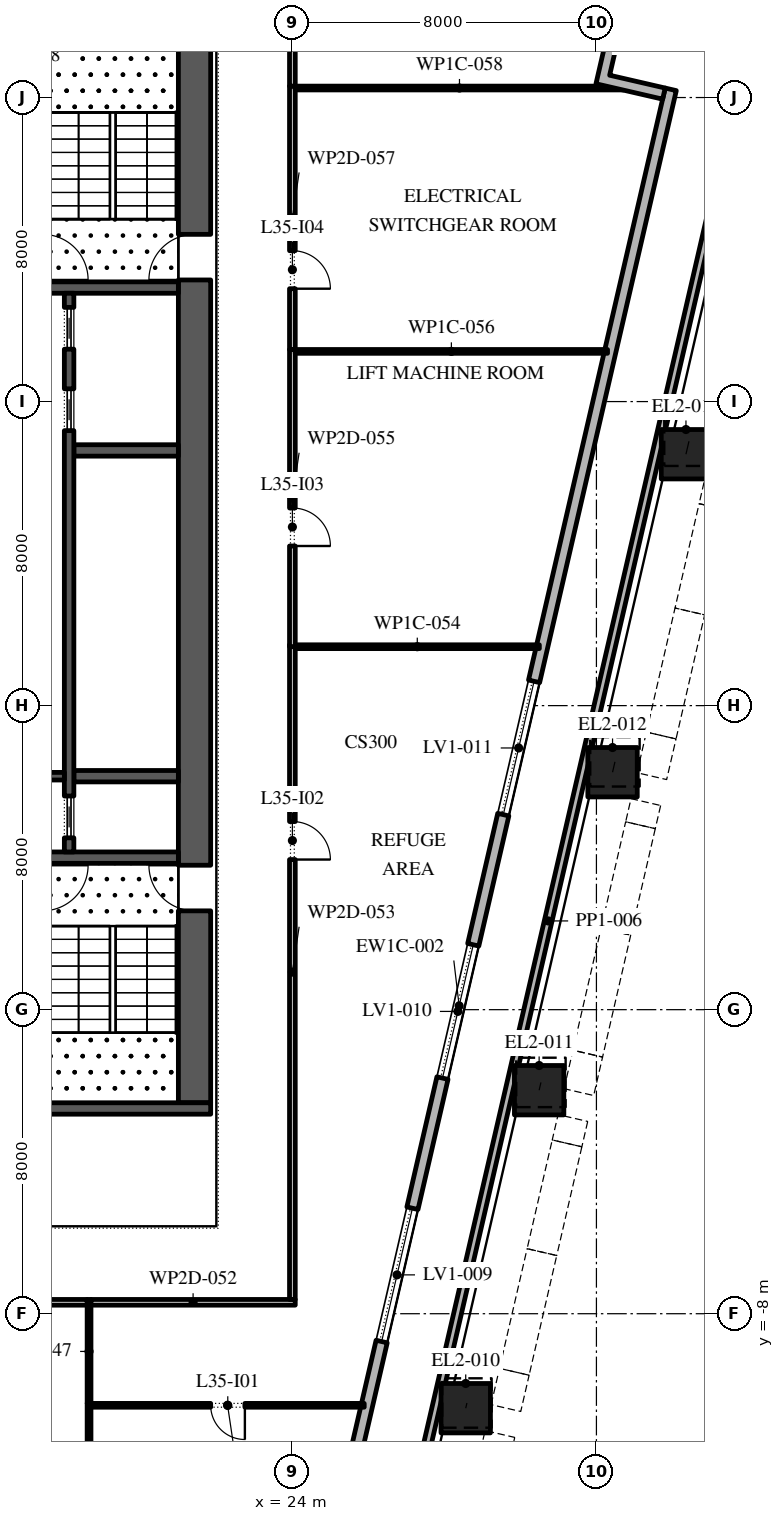
"""IFC4 building model, lengths in metres.
Left out: names, types, materials, properties, quantities, classifications, styles, units other than length and angle.
Written with IfcOpenShell. Run it as: python <this file> out.ifc"""

import sys

from ifc_helpers import new_model, si_unit, direction, frame, frame_2d, origin, origin_2d, place, context, subcontext, project, spatial, polyline, rectangle, outline, extrude, element, fill, save


model = new_model("IFC4")
c1 = context("Model", 3, precision=1e-05, world=origin(), true_north=direction((0.0, 1.0)))
c2 = subcontext(c1, "Body", "Model", "MODEL_VIEW")
j1 = project(units=[si_unit("LENGTHUNIT", "METRE"), si_unit("PLANEANGLEUNIT", "RADIAN")], contexts=[c1])
p1 = place(None, origin())
s1 = spatial("IfcSite", under=j1, at=p1, CompositionType="ELEMENT")
p2 = place(p1, origin())
s2 = spatial("IfcBuilding", under=s1, at=p2, CompositionType="ELEMENT")
p3 = place(p2, frame((0.0, 0.0, 160.2)))
s3 = spatial("IfcBuildingStorey", under=s2, at=p3, CompositionType="ELEMENT", Elevation=160.2)
p4 = place(p3, frame((28.561, -10.486, 0.0), z_axis=(0.005830129404, 0.025263894082, 0.999663816114), x_axis=(-0.974391195695, 0.224859506699, 0.0)))
e1 = element("IfcColumn", 1, at=p4, inside=s3, PredefinedType="COLUMN", context=c2, shape_type="SweptSolid", body=[
    extrude(rectangle(XDim=1.3, YDim=1.3, at=origin_2d()), origin(), (0.0, 0.0, 1.0), 5.402),
])
p5 = place(p3, frame((30.493, -2.119, 0.0), z_axis=(0.00871892839, 0.037902491811, 0.999243404483), x_axis=(-0.974547573978, 0.22418078877, 0.0)))
e2 = element("IfcColumn", 2, at=p5, inside=s3, PredefinedType="COLUMN", context=c2, shape_type="SweptSolid", body=[
    extrude(rectangle(XDim=1.3, YDim=1.3, at=origin_2d()), origin(), (0.0, 0.0, 1.0), 5.404),
])
p6 = place(p3, frame((32.424, 6.248, 0.0), z_axis=(0.011648492007, 0.05052194789, 0.99865501822), x_axis=(-0.97443520668, 0.22466870717, 0.0)))
e3 = element("IfcColumn", 3, at=p6, inside=s3, PredefinedType="COLUMN", context=c2, shape_type="SweptSolid", body=[
    extrude(rectangle(XDim=1.3, YDim=1.3, at=origin_2d()), origin(), (0.0, 0.0, 1.0), 5.407),
])
p7 = place(p3, frame((34.356, 14.615, 0.0), z_axis=(0.014572119901, 0.06316089121, 0.997896966196), x_axis=(-0.974402924741, 0.22480867478, 0.0)))
e4 = element("IfcColumn", 4, at=p7, inside=s3, PredefinedType="COLUMN", context=c2, shape_type="SweptSolid", body=[
    extrude(rectangle(XDim=1.3, YDim=1.3, at=origin_2d()), origin(), (0.0, 0.0, 1.0), 5.412),
])
p8 = place(p3, frame((22.82, -24.016, 0.0), z_axis=(0.0, 0.0, 1.0), x_axis=(0.224953880882, 0.974369412223, 0.0)))
e5 = element("IfcWall", 5, at=p8, inside=s3, PredefinedType="STANDARD", context=c2, shape_type="SweptSolid", body=[
    extrude(rectangle(XDim=49.5, YDim=0.3, at=frame_2d((24.75, 0.0))), origin(), (0.0, 0.0, 1.0), 4.95),
])
p9 = place(p8, frame((15.686, 0.0, 0.6)))
e6 = element("IfcOpeningElement", 6, at=p9, cuts=e5, PredefinedType="OPENING", context=c2, shape_type="SweptSolid", body=[
    extrude(rectangle(XDim=3.6, YDim=3.9, at=frame_2d((1.8, 1.95))), frame((0.0, 0.16, 0.0), z_axis=(0.0, -1.0, 0.0), x_axis=(1.0, 0.0, 0.0)), (0.0, 0.0, 1.0), 0.32),
])
p10 = place(p8, frame((22.8, 0.0, 0.6)))
e7 = element("IfcOpeningElement", 7, at=p10, cuts=e5, PredefinedType="OPENING", context=c2, shape_type="SweptSolid", body=[
    extrude(rectangle(XDim=3.6, YDim=3.9, at=frame_2d((1.8, 1.95))), frame((0.0, 0.16, 0.0), z_axis=(0.0, -1.0, 0.0), x_axis=(1.0, 0.0, 0.0)), (0.0, 0.0, 1.0), 0.32),
])
p11 = place(p8, frame((29.914, 0.0, 0.6)))
e8 = element("IfcOpeningElement", 8, at=p11, cuts=e5, PredefinedType="OPENING", context=c2, shape_type="SweptSolid", body=[
    extrude(rectangle(XDim=3.6, YDim=3.9, at=frame_2d((1.8, 1.95))), frame((0.0, 0.16, 0.0), z_axis=(0.0, -1.0, 0.0), x_axis=(1.0, 0.0, 0.0)), (0.0, 0.0, 1.0), 0.32),
])
p12 = place(p3, origin())
e9 = element("IfcWall", 9, at=p12, inside=s3, PredefinedType="STANDARD", context=c2, shape_type="SweptSolid", body=[
    extrude(outline(polyline([(32.393, 26.116), (30.639, 26.521), (31.111, 28.567), (31.404, 28.5), (30.999, 26.746), (32.753, 26.341), (32.348, 24.587), (33.809, 24.25), (33.742, 23.957), (31.988, 24.362), (32.393, 26.116)])), origin(), (0.0, 0.0, 1.0), 4.95),
])
p13 = place(p3, frame((24.143, -26.199, -0.05), z_axis=(0.0, 0.0, 1.0), x_axis=(0.224952358158, 0.974369763775, 0.0)))
e10 = element("IfcWall", 10, at=p13, inside=s3, PredefinedType="STANDARD", context=c2, shape_type="SweptSolid", body=[
    extrude(rectangle(XDim=58.569, YDim=0.2, at=frame_2d((29.285, 0.0))), origin(), (0.0, 0.0, 1.0), 1.1),
])
p14 = place(p3, frame((21.425, -2.45, 0.0), z_axis=(0.0, 0.0, 1.0), x_axis=(0.0, 1.0, 0.0)))
e11 = element("IfcWall", 11, at=p14, inside=s3, PredefinedType="SHEAR", context=c2, shape_type="SweptSolid", body=[
    extrude(rectangle(XDim=27.9, YDim=0.85, at=frame_2d((13.95, 0.0))), origin(), (0.0, 0.0, 1.0), 4.95),
])
p15 = place(p14, frame((5.05, 0.0, 0.0)))
e12 = element("IfcOpeningElement", 12, at=p15, cuts=e11, PredefinedType="OPENING", context=c2, shape_type="SweptSolid", body=[
    extrude(rectangle(XDim=1.2, YDim=2.1, at=frame_2d((0.6, 1.05))), frame((0.0, 0.435, 0.0), z_axis=(0.0, -1.0, 0.0), x_axis=(1.0, 0.0, 0.0)), (0.0, 0.0, 1.0), 0.87),
])
p16 = place(p14, frame((21.65, 0.0, 0.0)))
e13 = element("IfcOpeningElement", 13, at=p16, cuts=e11, PredefinedType="OPENING", context=c2, shape_type="SweptSolid", body=[
    extrude(rectangle(XDim=1.2, YDim=2.1, at=frame_2d((0.6, 1.05))), frame((0.0, 0.435, 0.0), z_axis=(0.0, -1.0, 0.0), x_axis=(1.0, 0.0, 0.0)), (0.0, 0.0, 1.0), 0.87),
])
p17 = place(p3, frame((10.15, -2.6, 0.0), z_axis=(0.0, 0.0, 1.0), x_axis=(1.0, 0.0, 0.0)))
e14 = element("IfcWall", 14, at=p17, inside=s3, PredefinedType="SHEAR", context=c2, shape_type="SweptSolid", body=[
    extrude(rectangle(XDim=11.7, YDim=0.3, at=frame_2d((5.85, 0.0))), origin(), (0.0, 0.0, 1.0), 4.95),
])
for number, where, z_axis, x_axis in (
    (15, (17.3, 4.0, 0.0), (0.0, 0.0, 1.0), (1.0, 0.0, 0.0)),
    (16, (17.3, 19.0, 0.0), (0.0, 0.0, 1.0), (1.0, 0.0, 0.0)),
):
    element("IfcWall", number, at=place(p3, frame(where, z_axis=z_axis, x_axis=x_axis)), inside=s3, PredefinedType="SHEAR", context=c2, shape_type="SweptSolid", body=[
        extrude(rectangle(XDim=3.7, YDim=0.3, at=frame_2d((1.85, 0.0))), origin(), (0.0, 0.0, 1.0), 4.95),
    ])
for number, where, z_axis, x_axis in (
    (17, (18.25, 6.143, 0.0), (0.0, 0.0, 1.0), (1.0, 0.0, 0.0)),
    (18, (18.25, 14.714, 0.0), (0.0, 0.0, 1.0), (1.0, 0.0, 0.0)),
):
    element("IfcWall", number, at=place(p3, frame(where, z_axis=z_axis, x_axis=x_axis)), inside=s3, PredefinedType="SHEAR", context=c2, shape_type="SweptSolid", body=[
        extrude(rectangle(XDim=2.75, YDim=0.3, at=frame_2d((1.375, 0.0))), origin(), (0.0, 0.0, 1.0), 4.95),
    ])
p18 = place(p3, frame((18.125, 4.15, 0.0), z_axis=(0.0, 0.0, 1.0), x_axis=(0.0, 1.0, 0.0)))
e19 = element("IfcWall", 19, at=p18, inside=s3, PredefinedType="SHEAR", context=c2, shape_type="SweptSolid", body=[
    extrude(rectangle(XDim=14.7, YDim=0.25, at=frame_2d((7.35, 0.0))), origin(), (0.0, 0.0, 1.0), 4.95),
])
p19 = place(p18, frame((0.371, 0.0, 0.0)))
e20 = element("IfcOpeningElement", 20, at=p19, cuts=e19, PredefinedType="OPENING", context=c2, shape_type="SweptSolid", body=[
    extrude(rectangle(XDim=1.1, YDim=2.1, at=frame_2d((0.55, 1.05))), frame((0.0, 0.135, 0.0), z_axis=(0.0, -1.0, 0.0), x_axis=(1.0, 0.0, 0.0)), (0.0, 0.0, 1.0), 0.27),
])
p20 = place(p18, frame((11.086, 0.0, 0.0)))
e21 = element("IfcOpeningElement", 21, at=p20, cuts=e19, PredefinedType="OPENING", context=c2, shape_type="SweptSolid", body=[
    extrude(rectangle(XDim=1.1, YDim=2.1, at=frame_2d((0.55, 1.05))), frame((0.0, 0.135, 0.0), z_axis=(0.0, -1.0, 0.0), x_axis=(1.0, 0.0, 0.0)), (0.0, 0.0, 1.0), 0.27),
])
p21 = place(p18, frame((13.229, 0.0, 0.0)))
e22 = element("IfcOpeningElement", 22, at=p21, cuts=e19, PredefinedType="OPENING", context=c2, shape_type="SweptSolid", body=[
    extrude(rectangle(XDim=1.1, YDim=2.1, at=frame_2d((0.55, 1.05))), frame((0.0, 0.135, 0.0), z_axis=(0.0, -1.0, 0.0), x_axis=(1.0, 0.0, 0.0)), (0.0, 0.0, 1.0), 0.27),
])
p22 = place(p3, frame((14.0, 6.143, 0.0), z_axis=(0.0, 0.0, 1.0), x_axis=(1.0, 0.0, 0.0)))
e23 = element("IfcWall", 23, at=p22, inside=s3, PredefinedType="SHEAR", context=c2, shape_type="SweptSolid", body=[
    extrude(rectangle(XDim=4.0, YDim=0.2, at=frame_2d((2.0, 0.0))), origin(), (0.0, 0.0, 1.0), 4.95),
])
p23 = place(p22, frame((1.4, 0.0, 0.0)))
e24 = element("IfcOpeningElement", 24, at=p23, cuts=e23, PredefinedType="OPENING", context=c2, shape_type="SweptSolid", body=[
    extrude(rectangle(XDim=1.2, YDim=2.1, at=frame_2d((0.6, 1.05))), frame((0.0, 0.11, 0.0), z_axis=(0.0, -1.0, 0.0), x_axis=(1.0, 0.0, 0.0)), (0.0, 0.0, 1.0), 0.22),
])
p24 = place(p3, frame((18.65, -13.95, 0.0), z_axis=(0.0, 0.0, 1.0), x_axis=(0.0, 1.0, 0.0)))
e25 = element("IfcWall", 25, at=p24, inside=s3, PredefinedType="PARTITIONING", context=c2, shape_type="SweptSolid", body=[
    extrude(rectangle(XDim=3.59, YDim=0.1, at=frame_2d((1.795, 0.0))), origin(), (0.0, 0.0, 1.0), 4.95),
])
p25 = place(p3, frame((18.65, -10.36, 0.0), z_axis=(0.0, 0.0, 1.0), x_axis=(0.0, 1.0, 0.0)))
e26 = element("IfcWall", 26, at=p25, inside=s3, PredefinedType="PARTITIONING", context=c2, shape_type="SweptSolid", body=[
    extrude(rectangle(XDim=2.735, YDim=0.1, at=frame_2d((1.368, 0.0))), origin(), (0.0, 0.0, 1.0), 4.95),
])
p26 = place(p3, frame((18.7, -10.41, 0.0), z_axis=(0.0, 0.0, 1.0), x_axis=(1.0, 0.0, 0.0)))
e27 = element("IfcWall", 27, at=p26, inside=s3, PredefinedType="PARTITIONING", context=c2, shape_type="SweptSolid", body=[
    extrude(rectangle(XDim=7.19, YDim=0.1, at=frame_2d((3.595, 0.0))), origin(), (0.0, 0.0, 1.0), 4.95),
])
p27 = place(p26, frame((3.15, 0.0, 0.0)))
e28 = element("IfcOpeningElement", 28, at=p27, cuts=e27, PredefinedType="OPENING", context=c2, shape_type="SweptSolid", body=[
    extrude(rectangle(XDim=0.9, YDim=2.1, at=frame_2d((0.45, 1.05))), frame((0.0, 0.06, 0.0), z_axis=(0.0, -1.0, 0.0), x_axis=(1.0, 0.0, 0.0)), (0.0, 0.0, 1.0), 0.12),
])
p28 = place(p3, frame((18.6, -7.7, 0.0), z_axis=(0.0, 0.0, 1.0), x_axis=(-1.0, 0.0, 0.0)))
e29 = element("IfcWall", 29, at=p28, inside=s3, PredefinedType="PARTITIONING", context=c2, shape_type="SweptSolid", body=[
    extrude(rectangle(XDim=10.6, YDim=0.15, at=frame_2d((5.3, 0.0))), origin(), (0.0, 0.0, 1.0), 4.95),
])
p29 = place(p28, frame((3.7, 0.0, 0.0)))
e30 = element("IfcOpeningElement", 30, at=p29, cuts=e29, PredefinedType="OPENING", context=c2, shape_type="SweptSolid", body=[
    extrude(rectangle(XDim=1.0, YDim=2.1, at=frame_2d((0.5, 1.05))), frame((0.0, 0.085, 0.0), z_axis=(0.0, -1.0, 0.0), x_axis=(1.0, 0.0, 0.0)), (0.0, 0.0, 1.0), 0.17),
])
p30 = place(p3, frame((24.075, -7.7, 0.0), z_axis=(0.0, 0.0, 1.0), x_axis=(-1.0, 0.0, 0.0)))
e31 = element("IfcWall", 31, at=p30, inside=s3, PredefinedType="PARTITIONING", context=c2, shape_type="SweptSolid", body=[
    extrude(rectangle(XDim=5.375, YDim=0.15, at=frame_2d((2.688, 0.0))), origin(), (0.0, 0.0, 1.0), 4.95),
])
p31 = place(p3, frame((24.0, 9.6, 0.0), z_axis=(0.0, 0.0, 1.0), x_axis=(0.0, -1.0, 0.0)))
e32 = element("IfcWall", 32, at=p31, inside=s3, PredefinedType="PARTITIONING", context=c2, shape_type="SweptSolid", body=[
    extrude(rectangle(XDim=17.225, YDim=0.15, at=frame_2d((8.613, 0.0))), origin(), (0.0, 0.0, 1.0), 4.95),
])
p32 = place(p31, frame((4.65, 0.0, 0.0)))
e33 = element("IfcOpeningElement", 33, at=p32, cuts=e32, PredefinedType="OPENING", context=c2, shape_type="SweptSolid", body=[
    extrude(rectangle(XDim=1.0, YDim=2.1, at=frame_2d((0.5, 1.05))), frame((0.0, 0.085, 0.0), z_axis=(0.0, -1.0, 0.0), x_axis=(1.0, 0.0, 0.0)), (0.0, 0.0, 1.0), 0.17),
])
p33 = place(p3, frame((24.075, 9.55, 0.0), z_axis=(0.0, 0.0, 1.0), x_axis=(1.0, 0.0, 0.0)))
e34 = element("IfcWall", 34, at=p33, inside=s3, PredefinedType="PARTITIONING", context=c2, shape_type="SweptSolid", body=[
    extrude(rectangle(XDim=6.423, YDim=0.1, at=frame_2d((3.211, 0.0))), origin(), (0.0, 0.0, 1.0), 4.95),
])
p34 = place(p3, frame((24.0, 17.37, 0.0), z_axis=(0.0, 0.0, 1.0), x_axis=(0.0, -1.0, 0.0)))
e35 = element("IfcWall", 35, at=p34, inside=s3, PredefinedType="PARTITIONING", context=c2, shape_type="SweptSolid", body=[
    extrude(rectangle(XDim=7.82, YDim=0.15, at=frame_2d((3.91, 0.0))), origin(), (0.0, 0.0, 1.0), 4.95),
])
p35 = place(p34, frame((4.17, 0.0, 0.0)))
e36 = element("IfcOpeningElement", 36, at=p35, cuts=e35, PredefinedType="OPENING", context=c2, shape_type="SweptSolid", body=[
    extrude(rectangle(XDim=1.0, YDim=2.1, at=frame_2d((0.5, 1.05))), frame((0.0, 0.085, 0.0), z_axis=(0.0, -1.0, 0.0), x_axis=(1.0, 0.0, 0.0)), (0.0, 0.0, 1.0), 0.17),
])
p36 = place(p3, frame((24.075, 17.32, 0.0), z_axis=(0.0, 0.0, 1.0), x_axis=(1.0, 0.0, 0.0)))
e37 = element("IfcWall", 37, at=p36, inside=s3, PredefinedType="PARTITIONING", context=c2, shape_type="SweptSolid", body=[
    extrude(rectangle(XDim=8.217, YDim=0.1, at=frame_2d((4.108, 0.0))), origin(), (0.0, 0.0, 1.0), 4.95),
])
p37 = place(p3, frame((24.0, 24.3, 0.0), z_axis=(0.0, 0.0, 1.0), x_axis=(0.0, -1.0, 0.0)))
e38 = element("IfcWall", 38, at=p37, inside=s3, PredefinedType="PARTITIONING", context=c2, shape_type="SweptSolid", body=[
    extrude(rectangle(XDim=6.93, YDim=0.15, at=frame_2d((3.465, 0.0))), origin(), (0.0, 0.0, 1.0), 4.95),
])
p38 = place(p37, frame((4.33, 0.0, 0.0)))
e39 = element("IfcOpeningElement", 39, at=p38, cuts=e38, PredefinedType="OPENING", context=c2, shape_type="SweptSolid", body=[
    extrude(rectangle(XDim=1.0, YDim=2.1, at=frame_2d((0.5, 1.05))), frame((0.0, 0.085, 0.0), z_axis=(0.0, -1.0, 0.0), x_axis=(1.0, 0.0, 0.0)), (0.0, 0.0, 1.0), 0.17),
])
p39 = place(p3, frame((24.075, 24.25, 0.0), z_axis=(0.0, 0.0, 1.0), x_axis=(1.0, 0.0, 0.0)))
e40 = element("IfcWall", 40, at=p39, inside=s3, PredefinedType="PARTITIONING", context=c2, shape_type="SweptSolid", body=[
    extrude(rectangle(XDim=8.643, YDim=0.1, at=frame_2d((4.322, 0.0))), origin(), (0.0, 0.0, 1.0), 4.95),
])
p40 = place(p3, frame((24.0, 27.325, 0.0), z_axis=(0.0, 0.0, 1.0), x_axis=(0.0, -1.0, 0.0)))
e41 = element("IfcWall", 41, at=p40, inside=s3, PredefinedType="PARTITIONING", context=c2, shape_type="SweptSolid", body=[
    extrude(rectangle(XDim=3.025, YDim=0.15, at=frame_2d((1.512, 0.0))), origin(), (0.0, 0.0, 1.0), 4.95),
])
p41 = place(p9, origin())
e42 = element("IfcWindow", 42, at=p41, inside=s3, PartitioningType="DOUBLE_PANEL_HORIZONTAL", PredefinedType="WINDOW", context=c2, shape_type="SweptSolid", body=[
    extrude(rectangle(XDim=3.6, YDim=3.9, at=frame_2d((1.8, 1.95))), frame((0.0, 0.03, 0.0), z_axis=(0.0, -1.0, 0.0), x_axis=(1.0, 0.0, 0.0)), (0.0, 0.0, 1.0), 0.06),
])
fill(e6, e42)
p42 = place(p10, origin())
e43 = element("IfcWindow", 43, at=p42, inside=s3, PartitioningType="DOUBLE_PANEL_HORIZONTAL", PredefinedType="WINDOW", context=c2, shape_type="SweptSolid", body=[
    extrude(rectangle(XDim=3.6, YDim=3.9, at=frame_2d((1.8, 1.95))), frame((0.0, 0.03, 0.0), z_axis=(0.0, -1.0, 0.0), x_axis=(1.0, 0.0, 0.0)), (0.0, 0.0, 1.0), 0.06),
])
fill(e7, e43)
p43 = place(p11, origin())
e44 = element("IfcWindow", 44, at=p43, inside=s3, PartitioningType="DOUBLE_PANEL_HORIZONTAL", PredefinedType="WINDOW", context=c2, shape_type="SweptSolid", body=[
    extrude(rectangle(XDim=3.6, YDim=3.9, at=frame_2d((1.8, 1.95))), frame((0.0, 0.03, 0.0), z_axis=(0.0, -1.0, 0.0), x_axis=(1.0, 0.0, 0.0)), (0.0, 0.0, 1.0), 0.06),
])
fill(e8, e44)
p44 = place(p19, origin())
e45 = element("IfcDoor", 45, at=p44, inside=s3, OperationType="SLIDING_TO_LEFT", PredefinedType="DOOR", context=c2, shape_type="SweptSolid", body=[
    extrude(rectangle(XDim=1.1, YDim=2.1, at=frame_2d((0.55, 1.05))), frame((0.0, 0.025, 0.0), z_axis=(0.0, -1.0, 0.0), x_axis=(1.0, 0.0, 0.0)), (0.0, 0.0, 1.0), 0.05),
])
fill(e20, e45)
p45 = place(p20, origin())
e46 = element("IfcDoor", 46, at=p45, inside=s3, OperationType="SLIDING_TO_LEFT", PredefinedType="DOOR", context=c2, shape_type="SweptSolid", body=[
    extrude(rectangle(XDim=1.1, YDim=2.1, at=frame_2d((0.55, 1.05))), frame((0.0, 0.025, 0.0), z_axis=(0.0, -1.0, 0.0), x_axis=(1.0, 0.0, 0.0)), (0.0, 0.0, 1.0), 0.05),
])
fill(e21, e46)
p46 = place(p21, origin())
e47 = element("IfcDoor", 47, at=p46, inside=s3, OperationType="SLIDING_TO_LEFT", PredefinedType="DOOR", context=c2, shape_type="SweptSolid", body=[
    extrude(rectangle(XDim=1.1, YDim=2.1, at=frame_2d((0.55, 1.05))), frame((0.0, 0.025, 0.0), z_axis=(0.0, -1.0, 0.0), x_axis=(1.0, 0.0, 0.0)), (0.0, 0.0, 1.0), 0.05),
])
fill(e22, e47)
p47 = place(p15, origin())
e48 = element("IfcDoor", 48, at=p47, inside=s3, OperationType="SINGLE_SWING_LEFT", PredefinedType="DOOR", context=c2, shape_type="SweptSolid", body=[
    extrude(rectangle(XDim=1.2, YDim=2.1, at=frame_2d((0.6, 1.05))), frame((0.0, 0.025, 0.0), z_axis=(0.0, -1.0, 0.0), x_axis=(1.0, 0.0, 0.0)), (0.0, 0.0, 1.0), 0.05),
])
fill(e12, e48)
p48 = place(p16, origin())
e49 = element("IfcDoor", 49, at=p48, inside=s3, OperationType="SINGLE_SWING_RIGHT", PredefinedType="DOOR", context=c2, shape_type="SweptSolid", body=[
    extrude(rectangle(XDim=1.2, YDim=2.1, at=frame_2d((0.6, 1.05))), frame((0.0, 0.025, 0.0), z_axis=(0.0, -1.0, 0.0), x_axis=(1.0, 0.0, 0.0)), (0.0, 0.0, 1.0), 0.05),
])
fill(e13, e49)
p49 = place(p27, frame((0.9, 0.0, 0.0), z_axis=(0.0, 0.0, 1.0), x_axis=(-1.0, 0.0, 0.0)))
e50 = element("IfcDoor", 50, at=p49, inside=s3, OperationType="SINGLE_SWING_RIGHT", PredefinedType="DOOR", context=c2, shape_type="SweptSolid", body=[
    extrude(rectangle(XDim=0.9, YDim=2.1, at=frame_2d((0.45, 1.05))), frame((0.0, 0.025, 0.0), z_axis=(0.0, -1.0, 0.0), x_axis=(1.0, 0.0, 0.0)), (0.0, 0.0, 1.0), 0.05),
])
fill(e28, e50)
p50 = place(p32, origin())
e51 = element("IfcDoor", 51, at=p50, inside=s3, OperationType="SINGLE_SWING_LEFT", PredefinedType="DOOR", context=c2, shape_type="SweptSolid", body=[
    extrude(rectangle(XDim=1.0, YDim=2.1, at=frame_2d((0.5, 1.05))), frame((0.0, 0.025, 0.0), z_axis=(0.0, -1.0, 0.0), x_axis=(1.0, 0.0, 0.0)), (0.0, 0.0, 1.0), 0.05),
])
fill(e33, e51)
p51 = place(p35, origin())
e52 = element("IfcDoor", 52, at=p51, inside=s3, OperationType="SINGLE_SWING_LEFT", PredefinedType="DOOR", context=c2, shape_type="SweptSolid", body=[
    extrude(rectangle(XDim=1.0, YDim=2.1, at=frame_2d((0.5, 1.05))), frame((0.0, 0.025, 0.0), z_axis=(0.0, -1.0, 0.0), x_axis=(1.0, 0.0, 0.0)), (0.0, 0.0, 1.0), 0.05),
])
fill(e36, e52)
p52 = place(p38, origin())
e53 = element("IfcDoor", 53, at=p52, inside=s3, OperationType="SINGLE_SWING_LEFT", PredefinedType="DOOR", context=c2, shape_type="SweptSolid", body=[
    extrude(rectangle(XDim=1.0, YDim=2.1, at=frame_2d((0.5, 1.05))), frame((0.0, 0.025, 0.0), z_axis=(0.0, -1.0, 0.0), x_axis=(1.0, 0.0, 0.0)), (0.0, 0.0, 1.0), 0.05),
])
fill(e39, e53)
save(model, sys.argv[1])
